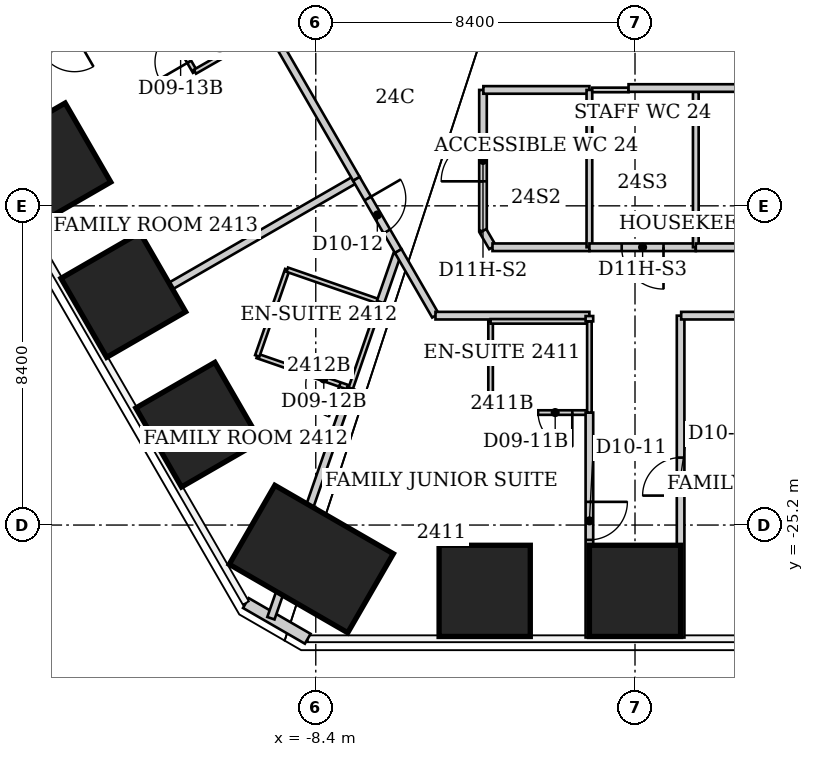
"""IFC4 building model, lengths in metres.
Left out: names, types, materials, properties, quantities, classifications, styles, units other than length and angle.
Written with IfcOpenShell. Run it as: python <this file> out.ifc"""

import sys

from ifc_helpers import new_model, si_unit, direction, frame, frame_2d, origin, origin_2d, place, context, subcontext, project, spatial, rectangle, extrude, element, fill, save


model = new_model("IFC4")
c1 = context("Model", 3, precision=1e-05, world=origin(), true_north=direction((0.0, 1.0)))
c2 = subcontext(c1, "Body", "Model", "MODEL_VIEW")
j1 = project(units=[si_unit("LENGTHUNIT", "METRE"), si_unit("PLANEANGLEUNIT", "RADIAN")], contexts=[c1])
p1 = place(None, origin())
s1 = spatial("IfcSite", under=j1, at=p1, CompositionType="ELEMENT")
p2 = place(p1, origin())
s2 = spatial("IfcBuilding", under=s1, at=p2, CompositionType="ELEMENT")
p3 = place(p2, frame((0.0, 0.0, 100.6)))
s3 = spatial("IfcBuildingStorey", under=s2, at=p3, CompositionType="ELEMENT", Elevation=100.6)
for number, where, z_axis, x_axis in (
    (1, (0.0, -26.932, 0.0), (0.0, 0.0, 1.0), (0.0, -1.0, 0.0)),
    (2, (-3.955, -26.932, 0.0), (0.0, 0.0, 1.0), (0.0, -1.0, 0.0)),
):
    element("IfcColumn", number, at=place(p3, frame(where, z_axis=z_axis, x_axis=x_axis)), inside=s3, PredefinedType="COLUMN", context=c2, shape_type="SweptSolid", body=[
        extrude(rectangle(XDim=2.4, YDim=2.4, at=origin_2d()), origin(), (0.0, 0.0, 1.0), 3.8),
    ])
p4 = place(p3, frame((-8.518, -26.094, 0.0), z_axis=(0.0, 0.0, 1.0), x_axis=(-0.5, -0.866025403784, 0.0)))
e3 = element("IfcColumn", 3, at=p4, inside=s3, PredefinedType="COLUMN", context=c2, shape_type="SweptSolid", body=[
    extrude(rectangle(XDim=2.4, YDim=3.6, at=origin_2d()), origin(), (0.0, 0.0, 1.0), 3.8),
])
for number, where, z_axis, x_axis in (
    (4, (-11.494, -22.559, 0.0), (0.0, 0.0, 1.0), (-0.866, -0.5, 0.0)),
    (5, (-13.464, -19.147, 0.0), (0.0, 0.0, 1.0), (-0.866, -0.5, 0.0)),
    (6, (-15.434, -15.735, 0.0), (0.0, 0.0, 1.0), (-0.866, -0.5, 0.0)),
):
    element("IfcColumn", number, at=place(p3, frame(where, z_axis=z_axis, x_axis=x_axis)), inside=s3, PredefinedType="COLUMN", context=c2, shape_type="SweptSolid", body=[
        extrude(rectangle(XDim=2.4, YDim=2.4, at=origin_2d()), origin(), (0.0, 0.0, 1.0), 3.8),
    ])
p5 = place(p3, frame((-8.611, -28.192, 0.0), z_axis=(0.0, 0.0, 1.0), x_axis=(-0.866045024864, 0.499966013754, 0.0)))
e7 = element("IfcWall", 7, at=p5, inside=s3, PredefinedType="SOLIDWALL", context=c2, shape_type="SweptSolid", body=[
    extrude(rectangle(XDim=1.88, YDim=0.3, at=frame_2d((0.94, 0.0))), origin(), (0.0, 0.0, 1.0), 3.64),
])
p6 = place(p3, frame((-17.824, -14.045, 0.0), z_axis=(0.0, 0.0, 1.0), x_axis=(0.866007919525, 0.500030282404, 0.0)))
e8 = element("IfcWall", 8, at=p6, inside=s3, PredefinedType="PARTITIONING", context=c2, shape_type="SweptSolid", body=[
    extrude(rectangle(XDim=5.79, YDim=0.2, at=frame_2d((2.895, 0.0))), origin(), (0.0, 0.0, 1.0), 3.64),
])
p7 = place(p6, frame((2.55, 0.0, 0.0)))
e9 = element("IfcOpeningElement", 9, at=p7, cuts=e8, PredefinedType="OPENING", context=c2, shape_type="SweptSolid", body=[
    extrude(rectangle(XDim=1.0, YDim=2.13, at=frame_2d((0.5, 1.065))), frame((0.0, 0.1, 0.0), z_axis=(0.0, -1.0, 0.0), x_axis=(1.0, 0.0, 0.0)), (0.0, 0.0, 1.0), 0.2),
])
p8 = place(p3, frame((-14.246, -20.08, 0.0), z_axis=(0.0, 0.0, 1.0), x_axis=(0.866178955952, 0.49973394548, 0.0)))
e10 = element("IfcWall", 10, at=p8, inside=s3, PredefinedType="PARTITIONING", context=c2, shape_type="SweptSolid", body=[
    extrude(rectangle(XDim=7.969, YDim=0.2, at=frame_2d((3.985, 0.0))), origin(), (0.0, 0.0, 1.0), 3.64),
])
p9 = place(p3, frame((-12.81, -11.15, 0.0), z_axis=(0.0, 0.0, 1.0), x_axis=(0.501813488763, -0.864975850817, 0.0)))
e11 = element("IfcWall", 11, at=p9, inside=s3, PredefinedType="PARTITIONING", context=c2, shape_type="SweptSolid", body=[
    extrude(rectangle(XDim=2.451, YDim=0.12, at=frame_2d((1.226, 0.0))), origin(), (0.0, 0.0, 1.0), 3.64),
])
p10 = place(p9, frame((1.251, 0.0, 0.0)))
e12 = element("IfcOpeningElement", 12, at=p10, cuts=e11, PredefinedType="OPENING", context=c2, shape_type="SweptSolid", body=[
    extrude(rectangle(XDim=0.9, YDim=2.03, at=frame_2d((0.45, 1.015))), frame((0.0, 0.06, 0.0), z_axis=(0.0, -1.0, 0.0), x_axis=(1.0, 0.0, 0.0)), (0.0, 0.0, 1.0), 0.12),
])
p11 = place(p3, frame((-11.58, -13.27, 0.0), z_axis=(0.0, 0.0, 1.0), x_axis=(0.867428373024, 0.497562074192, 0.0)))
e13 = element("IfcWall", 13, at=p11, inside=s3, PredefinedType="PARTITIONING", context=c2, shape_type="SweptSolid", body=[
    extrude(rectangle(XDim=2.271, YDim=0.12, at=frame_2d((1.136, 0.0))), origin(), (0.0, 0.0, 1.0), 3.64),
])
p12 = place(p3, frame((-9.94, -20.75, 0.0), z_axis=(0.0, 0.0, 1.0), x_axis=(0.94515546045, -0.326620813149, 0.0)))
e14 = element("IfcWall", 14, at=p12, inside=s3, PredefinedType="PARTITIONING", context=c2, shape_type="SweptSolid", body=[
    extrude(rectangle(XDim=2.603, YDim=0.12, at=frame_2d((1.301, 0.0))), origin(), (0.0, 0.0, 1.0), 3.64),
])
p13 = place(p12, frame((1.403, 0.0, 0.0)))
e15 = element("IfcOpeningElement", 15, at=p13, cuts=e14, PredefinedType="OPENING", context=c2, shape_type="SweptSolid", body=[
    extrude(rectangle(XDim=0.9, YDim=2.03, at=frame_2d((0.45, 1.015))), frame((0.0, 0.06, 0.0), z_axis=(0.0, -1.0, 0.0), x_axis=(1.0, 0.0, 0.0)), (0.0, 0.0, 1.0), 0.12),
])
p14 = place(p3, frame((-9.61, -12.14, 0.0), z_axis=(0.0, 0.0, 1.0), x_axis=(0.499898533245, -0.866083977718, 0.0)))
e16 = element("IfcWall", 16, at=p14, inside=s3, PredefinedType="PARTITIONING", context=c2, shape_type="SweptSolid", body=[
    extrude(rectangle(XDim=4.561, YDim=0.2, at=frame_2d((2.281, 0.0))), origin(), (0.0, 0.0, 1.0), 3.64),
])
p15 = place(p3, frame((-9.58, -27.652, 0.0), z_axis=(0.0, 0.0, 1.0), x_axis=(0.327855318627, 0.944727944991, 0.0)))
e17 = element("IfcWall", 17, at=p15, inside=s3, PredefinedType="PARTITIONING", context=c2, shape_type="SweptSolid", body=[
    extrude(rectangle(XDim=6.406, YDim=0.2, at=frame_2d((3.203, 0.0))), origin(), (0.0, 0.0, 1.0), 3.64),
])
p16 = place(p3, frame((-9.15, -18.48, 0.0), z_axis=(0.0, 0.0, 1.0), x_axis=(-0.328693963496, -0.944436487203, 0.0)))
e18 = element("IfcWall", 18, at=p16, inside=s3, PredefinedType="PARTITIONING", context=c2, shape_type="SweptSolid", body=[
    extrude(rectangle(XDim=2.404, YDim=0.12, at=frame_2d((1.202, 0.0))), origin(), (0.0, 0.0, 1.0), 3.64),
])
p17 = place(p3, frame((-7.48, -21.6, 0.0), z_axis=(0.0, 0.0, 1.0), x_axis=(0.326492166492, 0.945199907543, 0.0)))
e19 = element("IfcWall", 19, at=p17, inside=s3, PredefinedType="PARTITIONING", context=c2, shape_type="SweptSolid", body=[
    extrude(rectangle(XDim=2.4, YDim=0.12, at=frame_2d((1.2, 0.0))), origin(), (0.0, 0.0, 1.0), 3.64),
])
p18 = place(p3, frame((-7.331, -16.091, 0.0), z_axis=(0.0, 0.0, 1.0), x_axis=(0.501518373175, -0.865146994081, 0.0)))
e20 = element("IfcWall", 20, at=p18, inside=s3, PredefinedType="PARTITIONING", context=c2, shape_type="SweptSolid", body=[
    extrude(rectangle(XDim=2.196, YDim=0.2, at=frame_2d((1.098, 0.0))), origin(), (0.0, 0.0, 1.0), 3.64),
])
p19 = place(p18, frame((0.598, 0.0, 0.0)))
e21 = element("IfcOpeningElement", 21, at=p19, cuts=e20, PredefinedType="OPENING", context=c2, shape_type="SweptSolid", body=[
    extrude(rectangle(XDim=1.0, YDim=2.13, at=frame_2d((0.5, 1.065))), frame((0.0, 0.1, 0.0), z_axis=(0.0, -1.0, 0.0), x_axis=(1.0, 0.0, 0.0)), (0.0, 0.0, 1.0), 0.2),
])
p20 = place(p3, frame((-6.7, -19.33, 0.0), z_axis=(0.0, 0.0, 1.0), x_axis=(-0.944753042377, 0.327782990589, 0.0)))
e22 = element("IfcWall", 22, at=p20, inside=s3, PredefinedType="PARTITIONING", context=c2, shape_type="SweptSolid", body=[
    extrude(rectangle(XDim=2.594, YDim=0.12, at=frame_2d((1.297, 0.0))), origin(), (0.0, 0.0, 1.0), 3.64),
])
p21 = place(p3, frame((-6.696, -19.331, 0.0), z_axis=(0.0, 0.0, 1.0), x_axis=(0.328298231075, 0.944574121746, 0.0)))
e23 = element("IfcWall", 23, at=p21, inside=s3, PredefinedType="PARTITIONING", context=c2, shape_type="SweptSolid", body=[
    extrude(rectangle(XDim=1.32, YDim=0.2, at=frame_2d((0.66, 0.0))), origin(), (0.0, 0.0, 1.0), 3.64),
])
p22 = place(p3, frame((-6.23, -17.99, 0.0), z_axis=(0.0, 0.0, 1.0), x_axis=(0.499431599995, -0.866353321068, 0.0)))
e24 = element("IfcWall", 24, at=p22, inside=s3, PredefinedType="PARTITIONING", context=c2, shape_type="SweptSolid", body=[
    extrude(rectangle(XDim=1.962, YDim=0.2, at=frame_2d((0.981, 0.0))), origin(), (0.0, 0.0, 1.0), 3.64),
])
p23 = place(p3, frame((-5.25, -19.69, 0.0), z_axis=(0.0, 0.0, 1.0), x_axis=(1.0, 0.0, 0.0)))
e25 = element("IfcWall", 25, at=p23, inside=s3, PredefinedType="PARTITIONING", context=c2, shape_type="SweptSolid", body=[
    extrude(rectangle(XDim=4.05, YDim=0.2, at=frame_2d((2.025, 0.0))), origin(), (0.0, 0.0, 1.0), 3.64),
])
p24 = place(p3, frame((-4.0, -17.46, 0.0), z_axis=(0.0, 0.0, 1.0), x_axis=(0.0, 1.0, 0.0)))
e26 = element("IfcWall", 26, at=p24, inside=s3, PredefinedType="PARTITIONING", context=c2, shape_type="SweptSolid", body=[
    extrude(rectangle(XDim=3.71, YDim=0.2, at=frame_2d((1.855, 0.0))), origin(), (0.0, 0.0, 1.0), 2.878),
])
p25 = place(p24, frame((1.305, 0.0, 0.0)))
e27 = element("IfcOpeningElement", 27, at=p25, cuts=e26, PredefinedType="OPENING", context=c2, shape_type="SweptSolid", body=[
    extrude(rectangle(XDim=1.1, YDim=2.2, at=frame_2d((0.55, 1.1))), frame((0.0, 0.1, 0.0), z_axis=(0.0, -1.0, 0.0), x_axis=(1.0, 0.0, 0.0)), (0.0, 0.0, 1.0), 0.2),
])
p26 = place(p3, frame((-3.99, -13.75, 0.0), z_axis=(0.0, 0.0, 1.0), x_axis=(1.0, 0.0, 0.0)))
e28 = element("IfcWall", 28, at=p26, inside=s3, PredefinedType="PARTITIONING", context=c2, shape_type="SweptSolid", body=[
    extrude(rectangle(XDim=2.79, YDim=0.2, at=frame_2d((1.395, 0.0))), origin(), (0.0, 0.0, 1.0), 3.64),
])
p27 = place(p3, frame((-3.8, -22.24, 0.0), z_axis=(0.0, 0.0, 1.0), x_axis=(1.0, 0.0, 0.0)))
e29 = element("IfcWall", 29, at=p27, inside=s3, PredefinedType="PARTITIONING", context=c2, shape_type="SweptSolid", body=[
    extrude(rectangle(XDim=2.6, YDim=0.12, at=frame_2d((1.3, 0.0))), origin(), (0.0, 0.0, 1.0), 3.64),
])
p28 = place(p27, frame((1.25, 0.0, 0.0)))
e30 = element("IfcOpeningElement", 30, at=p28, cuts=e29, PredefinedType="OPENING", context=c2, shape_type="SweptSolid", body=[
    extrude(rectangle(XDim=0.9, YDim=2.03, at=frame_2d((0.45, 1.015))), frame((0.0, 0.06, 0.0), z_axis=(0.0, -1.0, 0.0), x_axis=(1.0, 0.0, 0.0)), (0.0, 0.0, 1.0), 0.12),
])
p29 = place(p3, frame((-3.8, -19.84, 0.0), z_axis=(0.0, 0.0, 1.0), x_axis=(0.0, -1.0, 0.0)))
e31 = element("IfcWall", 31, at=p29, inside=s3, PredefinedType="PARTITIONING", context=c2, shape_type="SweptSolid", body=[
    extrude(rectangle(XDim=2.4, YDim=0.12, at=frame_2d((1.2, 0.0))), origin(), (0.0, 0.0, 1.0), 3.64),
])
p30 = place(p3, frame((-3.75, -17.89, 0.0), z_axis=(0.0, 0.0, 1.0), x_axis=(-0.502680181512, 0.864472460588, 0.0)))
e32 = element("IfcWall", 32, at=p30, inside=s3, PredefinedType="PARTITIONING", context=c2, shape_type="SweptSolid", body=[
    extrude(rectangle(XDim=0.497, YDim=0.2, at=frame_2d((0.249, 0.0))), origin(), (0.0, 0.0, 1.0), 3.64),
])
p31 = place(p3, frame((-1.2, -22.24, 0.0), z_axis=(0.0, 0.0, 1.0), x_axis=(0.0, -1.0, 0.0)))
e33 = element("IfcWall", 33, at=p31, inside=s3, PredefinedType="PARTITIONING", context=c2, shape_type="SweptSolid", body=[
    extrude(rectangle(XDim=5.92, YDim=0.2, at=frame_2d((2.96, 0.0))), origin(), (0.0, 0.0, 1.0), 3.64),
])
p32 = place(p31, frame((2.35, 0.0, 0.0)))
e34 = element("IfcOpeningElement", 34, at=p32, cuts=e33, PredefinedType="OPENING", context=c2, shape_type="SweptSolid", body=[
    extrude(rectangle(XDim=1.0, YDim=2.13, at=frame_2d((0.5, 1.065))), frame((0.0, 0.1, 0.0), z_axis=(0.0, -1.0, 0.0), x_axis=(1.0, 0.0, 0.0)), (0.0, 0.0, 1.0), 0.2),
])
p33 = place(p3, frame((-1.2, -19.84, 0.0), z_axis=(0.0, 0.0, 1.0), x_axis=(-1.0, 0.0, 0.0)))
e35 = element("IfcWall", 35, at=p33, inside=s3, PredefinedType="PARTITIONING", context=c2, shape_type="SweptSolid", body=[
    extrude(rectangle(XDim=2.6, YDim=0.12, at=frame_2d((1.3, 0.0))), origin(), (0.0, 0.0, 1.0), 3.64),
])
p34 = place(p3, frame((-1.2, -19.84, 0.0), z_axis=(0.0, 0.0, 1.0), x_axis=(0.0, -1.0, 0.0)))
e36 = element("IfcWall", 36, at=p34, inside=s3, PredefinedType="PARTITIONING", context=c2, shape_type="SweptSolid", body=[
    extrude(rectangle(XDim=2.4, YDim=0.12, at=frame_2d((1.2, 0.0))), origin(), (0.0, 0.0, 1.0), 3.64),
])
p35 = place(p3, frame((-1.2, -19.7, 0.0), z_axis=(0.0, 0.0, 1.0), x_axis=(0.0, -1.0, 0.0)))
e37 = element("IfcWall", 37, at=p35, inside=s3, PredefinedType="PARTITIONING", context=c2, shape_type="SweptSolid", body=[
    extrude(rectangle(XDim=0.14, YDim=0.2, at=frame_2d((0.07, 0.0))), origin(), (0.0, 0.0, 1.0), 3.64),
])
p36 = place(p3, frame((-1.2, -17.89, 0.0), z_axis=(0.0, 0.0, 1.0), x_axis=(-1.0, 0.0, 0.0)))
e38 = element("IfcWall", 38, at=p36, inside=s3, PredefinedType="PARTITIONING", context=c2, shape_type="SweptSolid", body=[
    extrude(rectangle(XDim=2.55, YDim=0.2, at=frame_2d((1.275, 0.0))), origin(), (0.0, 0.0, 1.0), 3.64),
])
p37 = place(p3, frame((-1.2, -13.75, 0.0), z_axis=(0.0, 0.0, 1.0), x_axis=(0.0, -1.0, 0.0)))
e39 = element("IfcWall", 39, at=p37, inside=s3, PredefinedType="PARTITIONING", context=c2, shape_type="SweptSolid", body=[
    extrude(rectangle(XDim=4.14, YDim=0.15, at=frame_2d((2.07, 0.0))), origin(), (0.0, 0.0, 1.0), 3.64),
])
p38 = place(p3, frame((-1.125, -13.75, 0.0), z_axis=(0.0, 0.0, 1.0), x_axis=(1.0, 0.0, 0.0)))
e40 = element("IfcWall", 40, at=p38, inside=s3, PredefinedType="PARTITIONING", context=c2, shape_type="SweptSolid", body=[
    extrude(rectangle(XDim=0.955, YDim=0.12, at=frame_2d((0.478, 0.0))), origin(), (0.0, 0.0, 1.0), 3.64),
])
p39 = place(p3, frame((1.2, -28.16, 0.0), z_axis=(0.0, 0.0, 1.0), x_axis=(0.0, 1.0, 0.0)))
e41 = element("IfcWall", 41, at=p39, inside=s3, PredefinedType="PARTITIONING", context=c2, shape_type="SweptSolid", body=[
    extrude(rectangle(XDim=8.47, YDim=0.2, at=frame_2d((4.235, 0.0))), origin(), (0.0, 0.0, 1.0), 3.64),
])
p40 = place(p39, frame((3.735, 0.0, 0.0)))
e42 = element("IfcOpeningElement", 42, at=p40, cuts=e41, PredefinedType="OPENING", context=c2, shape_type="SweptSolid", body=[
    extrude(rectangle(XDim=1.0, YDim=2.13, at=frame_2d((0.5, 1.065))), frame((0.0, 0.1, 0.0), z_axis=(0.0, -1.0, 0.0), x_axis=(1.0, 0.0, 0.0)), (0.0, 0.0, 1.0), 0.2),
])
p41 = place(p3, frame((1.215, -19.69, 0.0), z_axis=(0.0, 0.0, 1.0), x_axis=(1.0, 0.0, 0.0)))
e43 = element("IfcWall", 43, at=p41, inside=s3, PredefinedType="PARTITIONING", context=c2, shape_type="SweptSolid", body=[
    extrude(rectangle(XDim=4.035, YDim=0.2, at=frame_2d((2.018, 0.0))), origin(), (0.0, 0.0, 1.0), 3.64),
])
p42 = place(p3, frame((1.6, -17.89, 0.0), z_axis=(0.0, 0.0, 1.0), x_axis=(-1.0, 0.0, 0.0)))
e44 = element("IfcWall", 44, at=p42, inside=s3, PredefinedType="PARTITIONING", context=c2, shape_type="SweptSolid", body=[
    extrude(rectangle(XDim=2.8, YDim=0.2, at=frame_2d((1.4, 0.0))), origin(), (0.0, 0.0, 1.0), 3.64),
])
p43 = place(p42, frame((0.85, 0.0, 0.0)))
e45 = element("IfcOpeningElement", 45, at=p43, cuts=e44, PredefinedType="OPENING", context=c2, shape_type="SweptSolid", body=[
    extrude(rectangle(XDim=1.1, YDim=2.2, at=frame_2d((0.55, 1.1))), frame((0.0, 0.1, 0.0), z_axis=(0.0, -1.0, 0.0), x_axis=(1.0, 0.0, 0.0)), (0.0, 0.0, 1.0), 0.2),
])
p44 = place(p3, frame((1.6, -13.8, 0.0), z_axis=(0.0, 0.0, 1.0), x_axis=(0.0, -1.0, 0.0)))
e46 = element("IfcWall", 46, at=p44, inside=s3, PredefinedType="PARTITIONING", context=c2, shape_type="SweptSolid", body=[
    extrude(rectangle(XDim=4.09, YDim=0.15, at=frame_2d((2.045, 0.0))), origin(), (0.0, 0.0, 1.0), 3.64),
])
p45 = place(p3, frame((3.75, -17.89, 0.0), z_axis=(0.0, 0.0, 1.0), x_axis=(-1.0, 0.0, 0.0)))
e47 = element("IfcWall", 47, at=p45, inside=s3, PredefinedType="PARTITIONING", context=c2, shape_type="SweptSolid", body=[
    extrude(rectangle(XDim=2.15, YDim=0.2, at=frame_2d((1.075, 0.0))), origin(), (0.0, 0.0, 1.0), 3.64),
])
p46 = place(p3, frame((8.534, -13.7, 0.0), z_axis=(0.0, 0.0, 1.0), x_axis=(-1.0, 0.0, 0.0)))
e48 = element("IfcWall", 48, at=p46, inside=s3, PredefinedType="PARTITIONING", context=c2, shape_type="SweptSolid", body=[
    extrude(rectangle(XDim=8.704, YDim=0.2, at=frame_2d((4.352, 0.0))), origin(), (0.0, 0.0, 1.0), 3.64),
])
p47 = place(p46, frame((3.802, 0.0, 0.0)))
e49 = element("IfcOpeningElement", 49, at=p47, cuts=e48, PredefinedType="OPENING", context=c2, shape_type="SweptSolid", body=[
    extrude(rectangle(XDim=1.1, YDim=2.2, at=frame_2d((0.55, 1.1))), frame((0.0, 0.1, 0.0), z_axis=(0.0, -1.0, 0.0), x_axis=(1.0, 0.0, 0.0)), (0.0, 0.0, 1.0), 0.2),
])
p48 = place(p40, origin())
e50 = element("IfcDoor", 50, at=p48, inside=s3, OperationType="SINGLE_SWING_LEFT", PredefinedType="DOOR", context=c2, shape_type="SweptSolid", body=[
    extrude(rectangle(XDim=1.0, YDim=2.13, at=frame_2d((0.5, 1.065))), frame((0.0, 0.025, 0.0), z_axis=(0.0, -1.0, 0.0), x_axis=(1.0, 0.0, 0.0)), (0.0, 0.0, 1.0), 0.05),
])
fill(e42, e50)
p49 = place(p32, origin())
e51 = element("IfcDoor", 51, at=p49, inside=s3, OperationType="SINGLE_SWING_LEFT", PredefinedType="DOOR", context=c2, shape_type="SweptSolid", body=[
    extrude(rectangle(XDim=1.0, YDim=2.13, at=frame_2d((0.5, 1.065))), frame((0.0, 0.025, 0.0), z_axis=(0.0, -1.0, 0.0), x_axis=(1.0, 0.0, 0.0)), (0.0, 0.0, 1.0), 0.05),
])
fill(e34, e51)
p50 = place(p28, origin())
e52 = element("IfcDoor", 52, at=p50, inside=s3, OperationType="SINGLE_SWING_RIGHT", PredefinedType="DOOR", context=c2, shape_type="SweptSolid", body=[
    extrude(rectangle(XDim=0.9, YDim=2.03, at=frame_2d((0.45, 1.015))), frame((0.0, 0.025, 0.0), z_axis=(0.0, -1.0, 0.0), x_axis=(1.0, 0.0, 0.0)), (0.0, 0.0, 1.0), 0.05),
])
fill(e30, e52)
p51 = place(p19, origin())
e53 = element("IfcDoor", 53, at=p51, inside=s3, OperationType="SINGLE_SWING_LEFT", PredefinedType="DOOR", context=c2, shape_type="SweptSolid", body=[
    extrude(rectangle(XDim=1.0, YDim=2.13, at=frame_2d((0.5, 1.065))), frame((0.0, 0.025, 0.0), z_axis=(0.0, -1.0, 0.0), x_axis=(1.0, 0.0, 0.0)), (0.0, 0.0, 1.0), 0.05),
])
fill(e21, e53)
p52 = place(p13, origin())
e54 = element("IfcDoor", 54, at=p52, inside=s3, OperationType="SINGLE_SWING_RIGHT", PredefinedType="DOOR", context=c2, shape_type="SweptSolid", body=[
    extrude(rectangle(XDim=0.9, YDim=2.03, at=frame_2d((0.45, 1.015))), frame((0.0, 0.025, 0.0), z_axis=(0.0, -1.0, 0.0), x_axis=(1.0, 0.0, 0.0)), (0.0, 0.0, 1.0), 0.05),
])
fill(e15, e54)
p53 = place(p7, origin())
e55 = element("IfcDoor", 55, at=p53, inside=s3, OperationType="SINGLE_SWING_RIGHT", PredefinedType="DOOR", context=c2, shape_type="SweptSolid", body=[
    extrude(rectangle(XDim=1.0, YDim=2.13, at=frame_2d((0.5, 1.065))), frame((0.0, 0.025, 0.0), z_axis=(0.0, -1.0, 0.0), x_axis=(1.0, 0.0, 0.0)), (0.0, 0.0, 1.0), 0.05),
])
fill(e9, e55)
p54 = place(p10, origin())
e56 = element("IfcDoor", 56, at=p54, inside=s3, OperationType="SINGLE_SWING_RIGHT", PredefinedType="DOOR", context=c2, shape_type="SweptSolid", body=[
    extrude(rectangle(XDim=0.9, YDim=2.03, at=frame_2d((0.45, 1.015))), frame((0.0, 0.025, 0.0), z_axis=(0.0, -1.0, 0.0), x_axis=(1.0, 0.0, 0.0)), (0.0, 0.0, 1.0), 0.05),
])
fill(e12, e56)
p55 = place(p25, origin())
e57 = element("IfcDoor", 57, at=p55, inside=s3, OperationType="SINGLE_SWING_LEFT", PredefinedType="DOOR", context=c2, shape_type="SweptSolid", body=[
    extrude(rectangle(XDim=1.1, YDim=2.2, at=frame_2d((0.55, 1.1))), frame((0.0, 0.025, 0.0), z_axis=(0.0, -1.0, 0.0), x_axis=(1.0, 0.0, 0.0)), (0.0, 0.0, 1.0), 0.05),
])
fill(e27, e57)
p56 = place(p43, origin())
e58 = element("IfcDoor", 58, at=p56, inside=s3, OperationType="SINGLE_SWING_LEFT", PredefinedType="DOOR", context=c2, shape_type="SweptSolid", body=[
    extrude(rectangle(XDim=1.1, YDim=2.2, at=frame_2d((0.55, 1.1))), frame((0.0, 0.025, 0.0), z_axis=(0.0, -1.0, 0.0), x_axis=(1.0, 0.0, 0.0)), (0.0, 0.0, 1.0), 0.05),
])
fill(e45, e58)
save(model, sys.argv[1])
